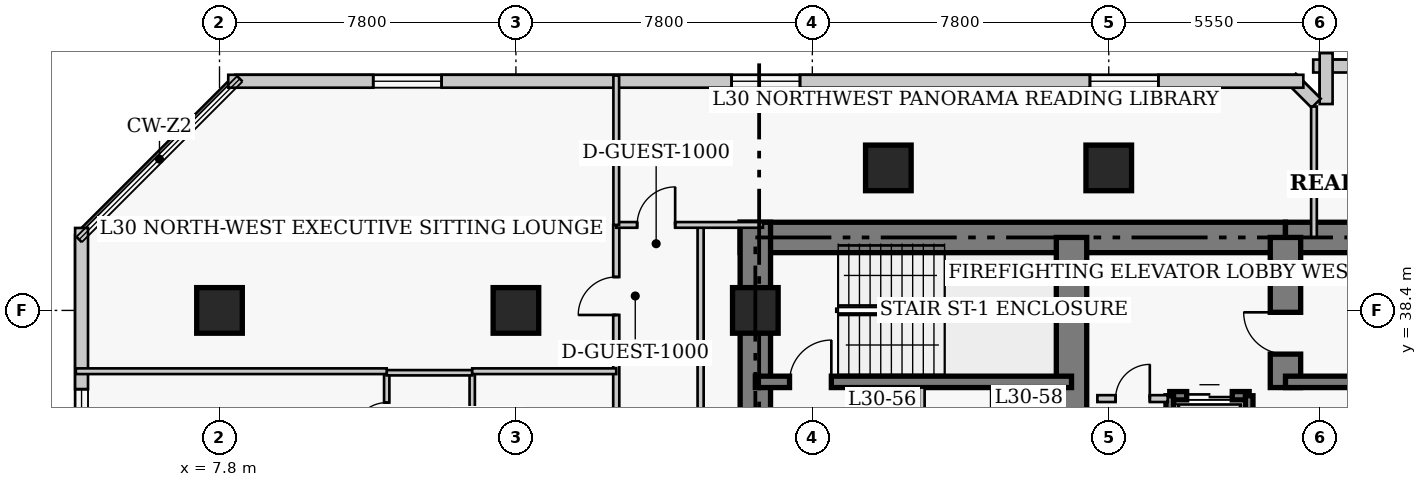
"""IFC4 building model, lengths in metres.
Left out: names, types, materials, properties, quantities, classifications, styles, units other than length and angle.
Written with IfcOpenShell. Run it as: python <this file> out.ifc"""

import sys

from ifc_helpers import new_model, si_unit, direction, frame, frame_2d, origin, origin_2d, place, context, subcontext, project, spatial, rectangle, extrude, element, fill, save


model = new_model("IFC4")
c1 = context("Model", 3, precision=1e-05, world=origin(), true_north=direction((0.0, 1.0)))
c2 = subcontext(c1, "Body", "Model", "MODEL_VIEW")
j1 = project(units=[si_unit("LENGTHUNIT", "METRE"), si_unit("PLANEANGLEUNIT", "RADIAN")], contexts=[c1])
p1 = place(None, origin())
s1 = spatial("IfcSite", under=j1, at=p1, CompositionType="ELEMENT")
p2 = place(p1, origin())
s2 = spatial("IfcBuilding", under=s1, at=p2, CompositionType="ELEMENT")
p3 = place(p2, frame((0.0, 0.0, 122.2)))
s3 = spatial("IfcBuildingStorey", under=s2, at=p3, CompositionType="ELEMENT", Elevation=122.2)
p4 = place(p3, frame((21.5, 40.32, 0.0), z_axis=(0.0, 0.0, 1.0), x_axis=(1.0, 0.0, 0.0)))
e1 = element("IfcWall", 1, at=p4, inside=s3, PredefinedType="SHEAR", context=c2, shape_type="SweptSolid", body=[
    extrude(rectangle(XDim=14.35, YDim=0.8, at=frame_2d((7.175, 0.0))), origin(), (0.0, 0.0, 1.0), 3.8),
])
p5 = place(p3, frame((35.85, 40.32, 0.0), z_axis=(0.0, 0.0, 1.0), x_axis=(1.0, 0.0, 0.0)))
e2 = element("IfcWall", 2, at=p5, inside=s3, PredefinedType="SHEAR", context=c2, shape_type="SweptSolid", body=[
    extrude(rectangle(XDim=12.6, YDim=0.8, at=frame_2d((6.3, 0.0))), origin(), (0.0, 0.0, 1.0), 3.8),
])
p6 = place(p3, frame((21.9, 27.05, 0.0), z_axis=(0.0, 0.0, 1.0), x_axis=(0.0, 1.0, 0.0)))
e3 = element("IfcWall", 3, at=p6, inside=s3, PredefinedType="SHEAR", context=c2, shape_type="SweptSolid", body=[
    extrude(rectangle(XDim=13.67, YDim=0.8, at=frame_2d((6.835, 0.0))), origin(), (0.0, 0.0, 1.0), 3.8),
])
p7 = place(p3, frame((30.22, 33.15, 0.0), z_axis=(0.0, 0.0, 1.0), x_axis=(0.0, 1.0, 0.0)))
e4 = element("IfcWall", 4, at=p7, inside=s3, PredefinedType="SHEAR", context=c2, shape_type="SweptSolid", body=[
    extrude(rectangle(XDim=7.17, YDim=0.8, at=frame_2d((3.585, 0.0))), origin(), (0.0, 0.0, 1.0), 3.8),
])
p8 = place(p3, frame((35.85, 36.37, 0.0), z_axis=(0.0, 0.0, 1.0), x_axis=(0.0, 1.0, 0.0)))
e5 = element("IfcWall", 5, at=p8, inside=s3, PredefinedType="SHEAR", context=c2, shape_type="SweptSolid", body=[
    extrude(rectangle(XDim=3.95, YDim=0.8, at=frame_2d((1.975, 0.0))), origin(), (0.0, 0.0, 1.0), 3.8),
])
p9 = place(p8, frame((0.88, 0.0, 0.0)))
e6 = element("IfcOpeningElement", 6, at=p9, cuts=e5, PredefinedType="OPENING", context=c2, shape_type="SweptSolid", body=[
    extrude(rectangle(XDim=1.1, YDim=2.15, at=frame_2d((0.55, 1.075))), frame((0.0, 0.41, 0.0), z_axis=(0.0, -1.0, 0.0), x_axis=(1.0, 0.0, 0.0)), (0.0, 0.0, 1.0), 0.82),
])
p10 = place(p3, frame((21.9, 36.52, 0.0), z_axis=(0.0, 0.0, 1.0), x_axis=(1.0, 0.0, 0.0)))
e7 = element("IfcWall", 7, at=p10, inside=s3, PredefinedType="SHEAR", context=c2, shape_type="SweptSolid", body=[
    extrude(rectangle(XDim=8.32, YDim=0.3, at=frame_2d((4.16, 0.0))), origin(), (0.0, 0.0, 1.0), 3.8),
])
p11 = place(p10, frame((0.9, 0.0, 0.0)))
e8 = element("IfcOpeningElement", 8, at=p11, cuts=e7, PredefinedType="OPENING", context=c2, shape_type="SweptSolid", body=[
    extrude(rectangle(XDim=1.1, YDim=2.15, at=frame_2d((0.55, 1.075))), frame((0.0, 0.16, 0.0), z_axis=(0.0, -1.0, 0.0), x_axis=(1.0, 0.0, 0.0)), (0.0, 0.0, 1.0), 0.32),
])
p12 = place(p3, frame((35.85, 36.52, 0.0), z_axis=(0.0, 0.0, 1.0), x_axis=(1.0, 0.0, 0.0)))
e9 = element("IfcWall", 9, at=p12, inside=s3, PredefinedType="SHEAR", context=c2, shape_type="SweptSolid", body=[
    extrude(rectangle(XDim=8.33, YDim=0.3, at=frame_2d((4.165, 0.0))), origin(), (0.0, 0.0, 1.0), 3.8),
])
for number, where, z_axis, x_axis in (
    (10, (7.8, 38.4, 0.0), (0.0, 0.0, 1.0), (1.0, 0.0, 0.0)),
    (11, (15.6, 38.4, 0.0), (0.0, 0.0, 1.0), (1.0, 0.0, 0.0)),
    (12, (21.9, 38.4, 0.0), (0.0, 0.0, 1.0), (1.0, 0.0, 0.0)),
    (13, (25.4, 42.15, 0.0), (0.0, 0.0, 1.0), (1.0, 0.0, 0.0)),
    (14, (31.2, 42.15, 0.0), (0.0, 0.0, 1.0), (1.0, 0.0, 0.0)),
):
    element("IfcColumn", number, at=place(p3, frame(where, z_axis=z_axis, x_axis=x_axis)), inside=s3, PredefinedType="COLUMN", context=c2, shape_type="SweptSolid", body=[
        extrude(rectangle(XDim=1.2, YDim=1.2, at=origin_2d()), origin(), (0.0, 0.0, 1.0), 3.8),
    ])
p13 = place(p3, frame((41.42, 44.83, 0.0), z_axis=(0.0, 0.0, 1.0), x_axis=(-1.0, 0.0, 0.0)))
e15 = element("IfcWall", 15, at=p13, inside=s3, PredefinedType="SOLIDWALL", context=c2, shape_type="SweptSolid", body=[
    extrude(rectangle(XDim=4.84, YDim=0.34, at=frame_2d((2.42, 0.0))), origin(), (0.0, 0.0, 1.0), 3.54),
])
p14 = place(p13, frame((1.52, 0.0, 0.85)))
e16 = element("IfcOpeningElement", 16, at=p14, cuts=e15, PredefinedType="OPENING", context=c2, shape_type="SweptSolid", body=[
    extrude(rectangle(XDim=1.8, YDim=1.8, at=frame_2d((0.9, 0.9))), frame((0.0, 0.18, 0.0), z_axis=(0.0, -1.0, 0.0), x_axis=(1.0, 0.0, 0.0)), (0.0, 0.0, 1.0), 0.36),
])
p15 = place(p3, frame((36.92, 45.17, 0.0), z_axis=(0.0, 0.0, 1.0), x_axis=(0.0, -1.0, 0.0)))
e17 = element("IfcWall", 17, at=p15, inside=s3, PredefinedType="SOLIDWALL", context=c2, shape_type="SweptSolid", body=[
    extrude(rectangle(XDim=1.34, YDim=0.34, at=frame_2d((0.67, 0.0))), origin(), (0.0, 0.0, 1.0), 3.54),
])
p16 = place(p3, frame((36.658, 43.852, 0.0), z_axis=(0.0, 0.0, 1.0), x_axis=(-0.707238225886, 0.706975312048, 0.0)))
e18 = element("IfcWall", 18, at=p16, inside=s3, PredefinedType="SOLIDWALL", context=c2, shape_type="SweptSolid", body=[
    extrude(rectangle(XDim=0.929, YDim=0.34, at=frame_2d((0.464, 0.0))), origin(), (0.0, 0.0, 1.0), 3.54),
])
p17 = place(p3, frame((36.32, 44.43, 0.0), z_axis=(0.0, 0.0, 1.0), x_axis=(-1.0, 0.0, 0.0)))
e19 = element("IfcWall", 19, at=p17, inside=s3, PredefinedType="SOLIDWALL", context=c2, shape_type="SweptSolid", body=[
    extrude(rectangle(XDim=28.29, YDim=0.34, at=frame_2d((14.145, 0.0))), origin(), (0.0, 0.0, 1.0), 3.54),
])
p18 = place(p17, frame((3.815, 0.0, 0.85)))
e20 = element("IfcOpeningElement", 20, at=p18, cuts=e19, PredefinedType="OPENING", context=c2, shape_type="SweptSolid", body=[
    extrude(rectangle(XDim=1.8, YDim=1.8, at=frame_2d((0.9, 0.9))), frame((0.0, 0.18, 0.0), z_axis=(0.0, -1.0, 0.0), x_axis=(1.0, 0.0, 0.0)), (0.0, 0.0, 1.0), 0.36),
])
p19 = place(p17, frame((13.245, 0.0, 0.85)))
e21 = element("IfcOpeningElement", 21, at=p19, cuts=e19, PredefinedType="OPENING", context=c2, shape_type="SweptSolid", body=[
    extrude(rectangle(XDim=1.8, YDim=1.8, at=frame_2d((0.9, 0.9))), frame((0.0, 0.18, 0.0), z_axis=(0.0, -1.0, 0.0), x_axis=(1.0, 0.0, 0.0)), (0.0, 0.0, 1.0), 0.36),
])
p20 = place(p17, frame((22.675, 0.0, 0.85)))
e22 = element("IfcOpeningElement", 22, at=p20, cuts=e19, PredefinedType="OPENING", context=c2, shape_type="SweptSolid", body=[
    extrude(rectangle(XDim=1.8, YDim=1.8, at=frame_2d((0.9, 0.9))), frame((0.0, 0.18, 0.0), z_axis=(0.0, -1.0, 0.0), x_axis=(1.0, 0.0, 0.0)), (0.0, 0.0, 1.0), 0.36),
])
p21 = place(p3, frame((4.17, 40.57, 0.0), z_axis=(0.0, 0.0, 1.0), x_axis=(0.0, -1.0, 0.0)))
e23 = element("IfcWall", 23, at=p21, inside=s3, PredefinedType="SOLIDWALL", context=c2, shape_type="SweptSolid", body=[
    extrude(rectangle(XDim=31.94, YDim=0.34, at=frame_2d((15.97, 0.0))), origin(), (0.0, 0.0, 1.0), 3.54),
])
p22 = place(p21, frame((4.242, 0.0, 0.85)))
e24 = element("IfcOpeningElement", 24, at=p22, cuts=e23, PredefinedType="OPENING", context=c2, shape_type="SweptSolid", body=[
    extrude(rectangle(XDim=1.8, YDim=1.8, at=frame_2d((0.9, 0.9))), frame((0.0, 0.18, 0.0), z_axis=(0.0, -1.0, 0.0), x_axis=(1.0, 0.0, 0.0)), (0.0, 0.0, 1.0), 0.36),
])
p23 = place(p21, frame((12.228, 0.0, 0.85)))
e25 = element("IfcOpeningElement", 25, at=p23, cuts=e23, PredefinedType="OPENING", context=c2, shape_type="SweptSolid", body=[
    extrude(rectangle(XDim=1.8, YDim=1.8, at=frame_2d((0.9, 0.9))), frame((0.0, 0.18, 0.0), z_axis=(0.0, -1.0, 0.0), x_axis=(1.0, 0.0, 0.0)), (0.0, 0.0, 1.0), 0.36),
])
p24 = place(p21, frame((18.413, 0.0, 0.85)))
e26 = element("IfcOpeningElement", 26, at=p24, cuts=e23, PredefinedType="OPENING", context=c2, shape_type="SweptSolid", body=[
    extrude(rectangle(XDim=1.8, YDim=1.8, at=frame_2d((0.9, 0.9))), frame((0.0, 0.18, 0.0), z_axis=(0.0, -1.0, 0.0), x_axis=(1.0, 0.0, 0.0)), (0.0, 0.0, 1.0), 0.36),
])
p25 = place(p21, frame((27.048, 0.0, 0.85)))
e27 = element("IfcOpeningElement", 27, at=p25, cuts=e23, PredefinedType="OPENING", context=c2, shape_type="SweptSolid", body=[
    extrude(rectangle(XDim=1.8, YDim=1.8, at=frame_2d((0.9, 0.9))), frame((0.0, 0.18, 0.0), z_axis=(0.0, -1.0, 0.0), x_axis=(1.0, 0.0, 0.0)), (0.0, 0.0, 1.0), 0.36),
])
p26 = place(p3, frame((32.805, 36.155, 0.0), z_axis=(0.0, 0.0, 1.0), x_axis=(1.0, 0.0, 0.0)))
e28 = element("IfcWall", 28, at=p26, inside=s3, PredefinedType="SHEAR", context=c2, shape_type="SweptSolid", body=[
    extrude(rectangle(XDim=2.09, YDim=0.22, at=frame_2d((1.045, 0.0))), origin(), (0.0, 0.0, 1.0), 3.8),
])
p27 = place(p26, frame((0.445, 0.0, 0.0)))
e29 = element("IfcOpeningElement", 29, at=p27, cuts=e28, PredefinedType="OPENING", context=c2, shape_type="SweptSolid", body=[
    extrude(rectangle(XDim=1.2, YDim=2.15, at=frame_2d((0.6, 1.075))), frame((0.0, 0.12, 0.0), z_axis=(0.0, -1.0, 0.0), x_axis=(1.0, 0.0, 0.0)), (0.0, 0.0, 1.0), 0.24),
])
for number, where, z_axis, x_axis in (
    (30, (32.805, 33.245, 0.0), (0.0, 0.0, 1.0), (0.0, 1.0, 0.0)),
    (31, (34.895, 33.245, 0.0), (0.0, 0.0, 1.0), (0.0, 1.0, 0.0)),
):
    element("IfcWall", number, at=place(p3, frame(where, z_axis=z_axis, x_axis=x_axis)), inside=s3, PredefinedType="SHEAR", context=c2, shape_type="SweptSolid", body=[
        extrude(rectangle(XDim=2.91, YDim=0.2, at=frame_2d((1.455, 0.0))), origin(), (0.0, 0.0, 1.0), 3.8),
    ])
p28 = place(p3, frame((30.9, 36.08, 0.0), z_axis=(0.0, 0.0, 1.0), x_axis=(1.0, 0.0, 0.0)))
e32 = element("IfcWall", 32, at=p28, inside=s3, PredefinedType="PARTITIONING", context=c2, shape_type="SweptSolid", body=[
    extrude(rectangle(XDim=1.85, YDim=0.18, at=frame_2d((0.925, 0.0))), origin(), (0.0, 0.0, 1.0), 3.54),
])
p29 = place(p28, frame((0.48, 0.0, 0.0)))
e33 = element("IfcOpeningElement", 33, at=p29, cuts=e32, PredefinedType="OPENING", context=c2, shape_type="SweptSolid", body=[
    extrude(rectangle(XDim=0.9, YDim=2.15, at=frame_2d((0.45, 1.075))), frame((0.0, 0.1, 0.0), z_axis=(0.0, -1.0, 0.0), x_axis=(1.0, 0.0, 0.0)), (0.0, 0.0, 1.0), 0.2),
])
p30 = place(p3, frame((24.48, 32.8, 0.0), z_axis=(0.0, 0.0, 1.0), x_axis=(0.0, 1.0, 0.0)))
e34 = element("IfcWall", 34, at=p30, inside=s3, PredefinedType="PARTITIONING", context=c2, shape_type="SweptSolid", body=[
    extrude(rectangle(XDim=3.57, YDim=0.16, at=frame_2d((1.785, 0.0))), origin(), (0.0, 0.0, 1.0), 3.54),
])
p31 = place(p30, frame((1.604, 0.0, 0.0)))
e35 = element("IfcOpeningElement", 35, at=p31, cuts=e34, PredefinedType="OPENING", context=c2, shape_type="SweptSolid", body=[
    extrude(rectangle(XDim=0.9, YDim=2.1, at=frame_2d((0.45, 1.05))), frame((0.0, 0.09, 0.0), z_axis=(0.0, -1.0, 0.0), x_axis=(1.0, 0.0, 0.0)), (0.0, 0.0, 1.0), 0.18),
])
for number, where, z_axis, x_axis in (
    (36, (26.28, 32.75, 0.0), (0.0, 0.0, 1.0), (0.0, 1.0, 0.0)),
    (37, (28.18, 32.75, 0.0), (0.0, 0.0, 1.0), (0.0, 1.0, 0.0)),
):
    element("IfcWall", number, at=place(p3, frame(where, z_axis=z_axis, x_axis=x_axis)), inside=s3, PredefinedType="PARTITIONING", context=c2, shape_type="SweptSolid", body=[
        extrude(rectangle(XDim=3.62, YDim=0.15, at=frame_2d((1.81, 0.0))), origin(), (0.0, 0.0, 1.0), 3.54),
    ])
p32 = place(p3, frame((18.24, 6.65, 0.0), z_axis=(0.0, 0.0, 1.0), x_axis=(0.0, 1.0, 0.0)))
e38 = element("IfcWall", 38, at=p32, inside=s3, PredefinedType="PARTITIONING", context=c2, shape_type="SweptSolid", body=[
    extrude(rectangle(XDim=34.0, YDim=0.16, at=frame_2d((17.0, 0.0))), origin(), (0.0, 0.0, 1.0), 3.54),
])
p33 = place(p32, frame((1.8, 0.0, 0.0)))
e39 = element("IfcOpeningElement", 39, at=p33, cuts=e38, PredefinedType="OPENING", context=c2, shape_type="SweptSolid", body=[
    extrude(rectangle(XDim=0.95, YDim=2.1, at=frame_2d((0.475, 1.05))), frame((0.0, 0.09, 0.0), z_axis=(0.0, -1.0, 0.0), x_axis=(1.0, 0.0, 0.0)), (0.0, 0.0, 1.0), 0.18),
])
p34 = place(p32, frame((8.475, 0.0, 0.0)))
e40 = element("IfcOpeningElement", 40, at=p34, cuts=e38, PredefinedType="OPENING", context=c2, shape_type="SweptSolid", body=[
    extrude(rectangle(XDim=0.95, YDim=2.1, at=frame_2d((0.475, 1.05))), frame((0.0, 0.09, 0.0), z_axis=(0.0, -1.0, 0.0), x_axis=(1.0, 0.0, 0.0)), (0.0, 0.0, 1.0), 0.18),
])
p35 = place(p32, frame((17.275, 0.0, 0.0)))
e41 = element("IfcOpeningElement", 41, at=p35, cuts=e38, PredefinedType="OPENING", context=c2, shape_type="SweptSolid", body=[
    extrude(rectangle(XDim=0.95, YDim=2.1, at=frame_2d((0.475, 1.05))), frame((0.0, 0.09, 0.0), z_axis=(0.0, -1.0, 0.0), x_axis=(1.0, 0.0, 0.0)), (0.0, 0.0, 1.0), 0.18),
])
p36 = place(p32, frame((25.675, 0.0, 0.0)))
e42 = element("IfcOpeningElement", 42, at=p36, cuts=e38, PredefinedType="OPENING", context=c2, shape_type="SweptSolid", body=[
    extrude(rectangle(XDim=0.95, YDim=2.1, at=frame_2d((0.475, 1.05))), frame((0.0, 0.09, 0.0), z_axis=(0.0, -1.0, 0.0), x_axis=(1.0, 0.0, 0.0)), (0.0, 0.0, 1.0), 0.18),
])
p37 = place(p32, frame((31.63, 0.0, 0.0)))
e43 = element("IfcOpeningElement", 43, at=p37, cuts=e38, PredefinedType="OPENING", context=c2, shape_type="SweptSolid", body=[
    extrude(rectangle(XDim=1.0, YDim=2.15, at=frame_2d((0.5, 1.075))), frame((0.0, 0.09, 0.0), z_axis=(0.0, -1.0, 0.0), x_axis=(1.0, 0.0, 0.0)), (0.0, 0.0, 1.0), 0.18),
])
p38 = place(p3, frame((20.46, 35.02, 0.0), z_axis=(0.0, 0.0, 1.0), x_axis=(0.0, 1.0, 0.0)))
e44 = element("IfcWall", 44, at=p38, inside=s3, PredefinedType="PARTITIONING", context=c2, shape_type="SweptSolid", body=[
    extrude(rectangle(XDim=5.63, YDim=0.16, at=frame_2d((2.815, 0.0))), origin(), (0.0, 0.0, 1.0), 3.54),
])
p39 = place(p3, frame((18.24, 40.65, 0.0), z_axis=(0.0, 0.0, 1.0), x_axis=(1.0, 0.0, 0.0)))
e45 = element("IfcWall", 45, at=p39, inside=s3, PredefinedType="PARTITIONING", context=c2, shape_type="SweptSolid", body=[
    extrude(rectangle(XDim=3.86, YDim=0.15, at=frame_2d((1.93, 0.0))), origin(), (0.0, 0.0, 1.0), 3.54),
])
p40 = place(p39, frame((0.55, 0.0, 0.0)))
e46 = element("IfcOpeningElement", 46, at=p40, cuts=e45, PredefinedType="OPENING", context=c2, shape_type="SweptSolid", body=[
    extrude(rectangle(XDim=1.0, YDim=2.15, at=frame_2d((0.5, 1.075))), frame((0.0, 0.085, 0.0), z_axis=(0.0, -1.0, 0.0), x_axis=(1.0, 0.0, 0.0)), (0.0, 0.0, 1.0), 0.17),
])
p41 = place(p3, frame((18.24, 40.65, 0.0), z_axis=(0.0, 0.0, 1.0), x_axis=(0.0, 1.0, 0.0)))
e47 = element("IfcWall", 47, at=p41, inside=s3, PredefinedType="PARTITIONING", context=c2, shape_type="SweptSolid", body=[
    extrude(rectangle(XDim=3.93, YDim=0.15, at=frame_2d((1.965, 0.0))), origin(), (0.0, 0.0, 1.0), 3.54),
])
p42 = place(p3, frame((36.6, 40.32, 0.0), z_axis=(0.0, 0.0, 1.0), x_axis=(0.0, 1.0, 0.0)))
e48 = element("IfcWall", 48, at=p42, inside=s3, PredefinedType="PARTITIONING", context=c2, shape_type="SweptSolid", body=[
    extrude(rectangle(XDim=3.445, YDim=0.15, at=frame_2d((1.723, 0.0))), origin(), (0.0, 0.0, 1.0), 3.54),
])
p43 = place(p3, frame((12.2, 34.31, 0.0), z_axis=(0.0, 0.0, 1.0), x_axis=(0.0, 1.0, 0.0)))
e49 = element("IfcWall", 49, at=p43, inside=s3, PredefinedType="PLUMBINGWALL", context=c2, shape_type="SweptSolid", body=[
    extrude(rectangle(XDim=2.45, YDim=0.14, at=frame_2d((1.225, 0.0))), origin(), (0.0, 0.0, 1.0), 3.54),
])
p44 = place(p43, frame((0.785, 0.0, 0.0)))
e50 = element("IfcOpeningElement", 50, at=p44, cuts=e49, PredefinedType="OPENING", context=c2, shape_type="SweptSolid", body=[
    extrude(rectangle(XDim=0.88, YDim=2.05, at=frame_2d((0.44, 1.025))), frame((0.0, 0.08, 0.0), z_axis=(0.0, -1.0, 0.0), x_axis=(1.0, 0.0, 0.0)), (0.0, 0.0, 1.0), 0.16),
])
p45 = place(p3, frame((14.45, 34.31, 0.0), z_axis=(0.0, 0.0, 1.0), x_axis=(0.0, 1.0, 0.0)))
e51 = element("IfcWall", 51, at=p45, inside=s3, PredefinedType="PLUMBINGWALL", context=c2, shape_type="SweptSolid", body=[
    extrude(rectangle(XDim=2.45, YDim=0.14, at=frame_2d((1.225, 0.0))), origin(), (0.0, 0.0, 1.0), 3.54),
])
p46 = place(p3, frame((12.2, 36.76, 0.0), z_axis=(0.0, 0.0, 1.0), x_axis=(1.0, 0.0, 0.0)))
e52 = element("IfcWall", 52, at=p46, inside=s3, PredefinedType="PLUMBINGWALL", context=c2, shape_type="SweptSolid", body=[
    extrude(rectangle(XDim=2.25, YDim=0.14, at=frame_2d((1.125, 0.0))), origin(), (0.0, 0.0, 1.0), 3.54),
])
p47 = place(p3, frame((4.02, 36.8, 0.0), z_axis=(0.0, 0.0, 1.0), x_axis=(1.0, 0.0, 0.0)))
e53 = element("IfcWall", 53, at=p47, inside=s3, PredefinedType="PARTITIONING", context=c2, shape_type="SweptSolid", body=[
    extrude(rectangle(XDim=8.18, YDim=0.15, at=frame_2d((4.09, 0.0))), origin(), (0.0, 0.0, 1.0), 3.54),
])
p48 = place(p3, frame((14.45, 36.8, 0.0), z_axis=(0.0, 0.0, 1.0), x_axis=(1.0, 0.0, 0.0)))
e54 = element("IfcWall", 54, at=p48, inside=s3, PredefinedType="PARTITIONING", context=c2, shape_type="SweptSolid", body=[
    extrude(rectangle(XDim=3.79, YDim=0.15, at=frame_2d((1.895, 0.0))), origin(), (0.0, 0.0, 1.0), 3.54),
])
p49 = place(p18, origin())
e55 = element("IfcWindow", 55, at=p49, inside=s3, PartitioningType="SINGLE_PANEL", PredefinedType="WINDOW", context=c2, shape_type="SweptSolid", body=[
    extrude(rectangle(XDim=1.8, YDim=1.8, at=frame_2d((0.9, 0.9))), frame((0.0, 0.03, 0.0), z_axis=(0.0, -1.0, 0.0), x_axis=(1.0, 0.0, 0.0)), (0.0, 0.0, 1.0), 0.06),
])
fill(e20, e55)
p50 = place(p19, origin())
e56 = element("IfcWindow", 56, at=p50, inside=s3, PartitioningType="SINGLE_PANEL", PredefinedType="WINDOW", context=c2, shape_type="SweptSolid", body=[
    extrude(rectangle(XDim=1.8, YDim=1.8, at=frame_2d((0.9, 0.9))), frame((0.0, 0.03, 0.0), z_axis=(0.0, -1.0, 0.0), x_axis=(1.0, 0.0, 0.0)), (0.0, 0.0, 1.0), 0.06),
])
fill(e21, e56)
p51 = place(p20, origin())
e57 = element("IfcWindow", 57, at=p51, inside=s3, PartitioningType="SINGLE_PANEL", PredefinedType="WINDOW", context=c2, shape_type="SweptSolid", body=[
    extrude(rectangle(XDim=1.8, YDim=1.8, at=frame_2d((0.9, 0.9))), frame((0.0, 0.03, 0.0), z_axis=(0.0, -1.0, 0.0), x_axis=(1.0, 0.0, 0.0)), (0.0, 0.0, 1.0), 0.06),
])
fill(e22, e57)
p52 = place(p22, origin())
e58 = element("IfcWindow", 58, at=p52, inside=s3, PartitioningType="SINGLE_PANEL", PredefinedType="WINDOW", context=c2, shape_type="SweptSolid", body=[
    extrude(rectangle(XDim=1.8, YDim=1.8, at=frame_2d((0.9, 0.9))), frame((0.0, 0.03, 0.0), z_axis=(0.0, -1.0, 0.0), x_axis=(1.0, 0.0, 0.0)), (0.0, 0.0, 1.0), 0.06),
])
fill(e24, e58)
p53 = place(p27, origin())
e59 = element("IfcDoor", 59, at=p53, inside=s3, OperationType="DOUBLE_DOOR_SLIDING", PredefinedType="DOOR", context=c2, shape_type="SweptSolid", body=[
    extrude(rectangle(XDim=1.2, YDim=2.15, at=frame_2d((0.6, 1.075))), frame((0.0, 0.025, 0.0), z_axis=(0.0, -1.0, 0.0), x_axis=(1.0, 0.0, 0.0)), (0.0, 0.0, 1.0), 0.05),
])
fill(e29, e59)
p54 = place(p29, origin())
e60 = element("IfcDoor", 60, at=p54, inside=s3, OperationType="SINGLE_SWING_RIGHT", PredefinedType="DOOR", context=c2, shape_type="SweptSolid", body=[
    extrude(rectangle(XDim=0.9, YDim=2.15, at=frame_2d((0.45, 1.075))), frame((0.0, 0.025, 0.0), z_axis=(0.0, -1.0, 0.0), x_axis=(1.0, 0.0, 0.0)), (0.0, 0.0, 1.0), 0.05),
])
fill(e33, e60)
p55 = place(p40, origin())
e61 = element("IfcDoor", 61, at=p55, inside=s3, OperationType="SINGLE_SWING_RIGHT", PredefinedType="DOOR", context=c2, shape_type="SweptSolid", body=[
    extrude(rectangle(XDim=1.0, YDim=2.15, at=frame_2d((0.5, 1.075))), frame((0.0, 0.025, 0.0), z_axis=(0.0, -1.0, 0.0), x_axis=(1.0, 0.0, 0.0)), (0.0, 0.0, 1.0), 0.05),
])
fill(e46, e61)
p56 = place(p44, origin())
e62 = element("IfcDoor", 62, at=p56, inside=s3, OperationType="SINGLE_SWING_LEFT", PredefinedType="DOOR", context=c2, shape_type="SweptSolid", body=[
    extrude(rectangle(XDim=0.88, YDim=2.05, at=frame_2d((0.44, 1.025))), frame((0.0, 0.025, 0.0), z_axis=(0.0, -1.0, 0.0), x_axis=(1.0, 0.0, 0.0)), (0.0, 0.0, 1.0), 0.05),
])
fill(e50, e62)
p57 = place(p37, origin())
e63 = element("IfcDoor", 63, at=p57, inside=s3, OperationType="SINGLE_SWING_LEFT", PredefinedType="DOOR", context=c2, shape_type="SweptSolid", body=[
    extrude(rectangle(XDim=1.0, YDim=2.15, at=frame_2d((0.5, 1.075))), frame((0.0, 0.025, 0.0), z_axis=(0.0, -1.0, 0.0), x_axis=(1.0, 0.0, 0.0)), (0.0, 0.0, 1.0), 0.05),
])
fill(e43, e63)
p58 = place(p11, origin())
e64 = element("IfcDoor", 64, at=p58, inside=s3, OperationType="SINGLE_SWING_RIGHT", PredefinedType="DOOR", context=c2, shape_type="SweptSolid", body=[
    extrude(rectangle(XDim=1.1, YDim=2.15, at=frame_2d((0.55, 1.075))), frame((0.0, 0.025, 0.0), z_axis=(0.0, -1.0, 0.0), x_axis=(1.0, 0.0, 0.0)), (0.0, 0.0, 1.0), 0.05),
])
fill(e8, e64)
p59 = place(p9, origin())
e65 = element("IfcDoor", 65, at=p59, inside=s3, OperationType="SINGLE_SWING_RIGHT", PredefinedType="DOOR", context=c2, shape_type="SweptSolid", body=[
    extrude(rectangle(XDim=1.1, YDim=2.15, at=frame_2d((0.55, 1.075))), frame((0.0, 0.025, 0.0), z_axis=(0.0, -1.0, 0.0), x_axis=(1.0, 0.0, 0.0)), (0.0, 0.0, 1.0), 0.05),
])
fill(e6, e65)
save(model, sys.argv[1])
